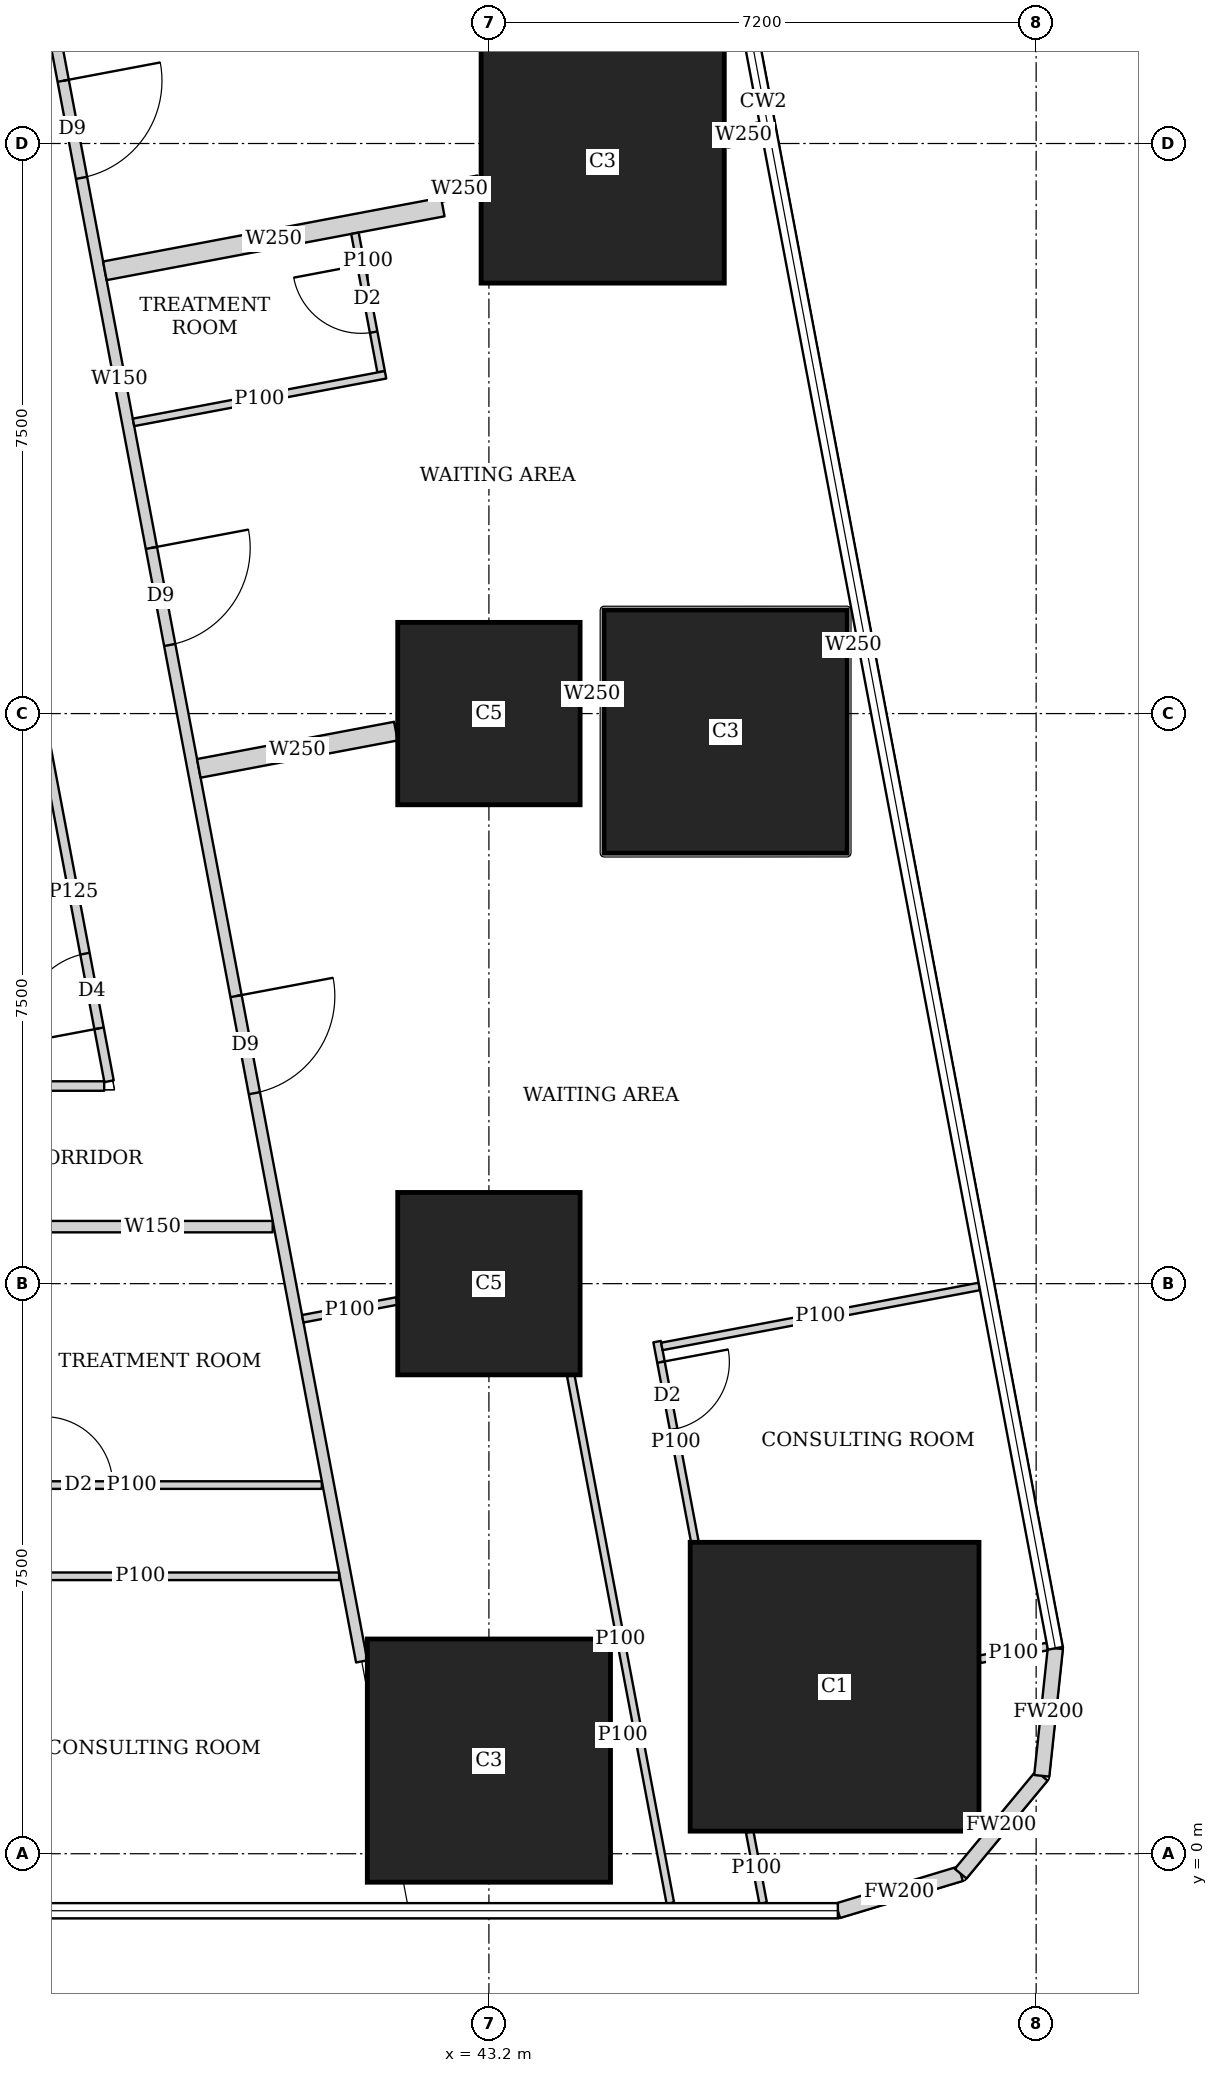
"""IFC4 building model, lengths in metres.
Left out: names, types, materials, properties, quantities, classifications, styles, units other than length and angle.
Written with IfcOpenShell. Run it as: python <this file> out.ifc"""

import sys

from ifc_helpers import new_model, si_unit, direction, frame, frame_2d, origin, origin_2d, place, context, subcontext, project, spatial, rectangle, extrude, element, fill, save


model = new_model("IFC4")
c1 = context("Model", 3, precision=1e-05, world=origin(), true_north=direction((0.0, 1.0)))
c2 = subcontext(c1, "Body", "Model", "MODEL_VIEW")
j1 = project(units=[si_unit("LENGTHUNIT", "METRE"), si_unit("PLANEANGLEUNIT", "RADIAN")], contexts=[c1])
p1 = place(None, origin())
s1 = spatial("IfcSite", under=j1, at=p1, CompositionType="ELEMENT")
p2 = place(p1, origin())
s2 = spatial("IfcBuilding", under=s1, at=p2, CompositionType="ELEMENT")
p3 = place(p2, frame((0.0, 0.0, 5.6)))
s3 = spatial("IfcBuildingStorey", under=s2, at=p3, CompositionType="ELEMENT", Elevation=5.6)
p4 = place(p3, frame((43.2, 1.225, 0.0), z_axis=(0.0, 0.0, 1.0), x_axis=(1.0, 0.0, 0.0)))
e1 = element("IfcColumn", 1, at=p4, inside=s3, PredefinedType="COLUMN", context=c2, shape_type="SweptSolid", body=[
    extrude(rectangle(XDim=3.2, YDim=3.2, at=origin_2d()), origin(), (0.0, 0.0, 1.0), 4.5),
])
p5 = place(p3, frame((47.748, 2.197, 0.0), z_axis=(0.0, 0.0, 1.0), x_axis=(1.0, 0.0, 0.0)))
e2 = element("IfcColumn", 2, at=p5, inside=s3, PredefinedType="COLUMN", context=c2, shape_type="SweptSolid", body=[
    extrude(rectangle(XDim=3.8, YDim=3.8, at=origin_2d()), origin(), (0.0, 0.0, 1.0), 4.5),
])
for number, where, z_axis, x_axis in (
    (3, (43.2, 7.5, 0.0), (0.0, 0.0, 1.0), (1.0, 0.0, 0.0)),
    (4, (43.2, 15.0, 0.0), (0.0, 0.0, 1.0), (1.0, 0.0, 0.0)),
):
    element("IfcColumn", number, at=place(p3, frame(where, z_axis=z_axis, x_axis=x_axis)), inside=s3, PredefinedType="COLUMN", context=c2, shape_type="SweptSolid", body=[
        extrude(rectangle(XDim=2.4, YDim=2.4, at=origin_2d()), origin(), (0.0, 0.0, 1.0), 4.5),
    ])
for number, where, z_axis, x_axis in (
    (5, (46.314, 14.763, 0.0), (0.0, 0.0, 1.0), (1.0, 0.0, 0.0)),
    (6, (44.697, 22.263, 0.0), (0.0, 0.0, 1.0), (1.0, 0.0, 0.0)),
):
    element("IfcColumn", number, at=place(p3, frame(where, z_axis=z_axis, x_axis=x_axis)), inside=s3, PredefinedType="COLUMN", context=c2, shape_type="SweptSolid", body=[
        extrude(rectangle(XDim=3.2, YDim=3.2, at=origin_2d()), origin(), (0.0, 0.0, 1.0), 4.5),
    ])
p6 = place(p3, frame((47.791, -0.75, 0.0), z_axis=(0.0, 0.0, 1.0), x_axis=(0.957455232626, 0.288581838509, 0.0)))
e7 = element("IfcWall", 7, at=p6, inside=s3, PredefinedType="SOLIDWALL", context=c2, shape_type="SweptSolid", body=[
    extrude(rectangle(XDim=1.688, YDim=0.2, at=frame_2d((0.844, 0.0))), origin(), (0.0, 0.0, 1.0), 4.2),
])
p7 = place(p3, frame((49.407, -0.263, 0.0), z_axis=(0.0, 0.0, 1.0), x_axis=(0.638042593423, 0.770001070764, 0.0)))
e8 = element("IfcWall", 8, at=p7, inside=s3, PredefinedType="SOLIDWALL", context=c2, shape_type="SweptSolid", body=[
    extrude(rectangle(XDim=1.673, YDim=0.2, at=frame_2d((0.836, 0.0))), origin(), (0.0, 0.0, 1.0), 4.2),
])
p8 = place(p3, frame((50.474, 1.025, 0.0), z_axis=(0.0, 0.0, 1.0), x_axis=(0.106047815515, 0.994361031429, 0.0)))
e9 = element("IfcWall", 9, at=p8, inside=s3, PredefinedType="SOLIDWALL", context=c2, shape_type="SweptSolid", body=[
    extrude(rectangle(XDim=1.688, YDim=0.2, at=frame_2d((0.844, 0.0))), origin(), (0.0, 0.0, 1.0), 4.2),
])
p9 = place(p3, frame((40.355, 8.25, 0.0), z_axis=(0.0, 0.0, 1.0), x_axis=(-1.0, 0.0, 0.0)))
e10 = element("IfcWall", 10, at=p9, inside=s3, PredefinedType="SOLIDWALL", context=c2, shape_type="SweptSolid", body=[
    extrude(rectangle(XDim=3.154, YDim=0.15, at=frame_2d((1.577, 0.0))), origin(), (0.0, 0.0, 1.0), 2.6),
])
p10 = place(p3, frame((35.151, 36.285, 0.0), z_axis=(0.0, 0.0, 1.0), x_axis=(0.18558085056, -0.982628998099, 0.0)))
e11 = element("IfcWall", 11, at=p10, inside=s3, PredefinedType="SOLIDWALL", context=c2, shape_type="SweptSolid", body=[
    extrude(rectangle(XDim=34.352, YDim=0.15, at=frame_2d((17.176, 0.0))), origin(), (0.0, 0.0, 1.0), 2.4),
])
p11 = place(p10, frame((13.189, 0.0, 0.0)))
e12 = element("IfcOpeningElement", 12, at=p11, cuts=e11, PredefinedType="OPENING", context=c2, shape_type="SweptSolid", body=[
    extrude(rectangle(XDim=1.3, YDim=2.1, at=frame_2d((0.65, 1.05))), frame((0.0, 0.085, 0.0), z_axis=(0.0, -1.0, 0.0), x_axis=(1.0, 0.0, 0.0)), (0.0, 0.0, 1.0), 0.17),
])
p12 = place(p10, frame((19.443, 0.0, 0.0)))
e13 = element("IfcOpeningElement", 13, at=p12, cuts=e11, PredefinedType="OPENING", context=c2, shape_type="SweptSolid", body=[
    extrude(rectangle(XDim=1.3, YDim=2.1, at=frame_2d((0.65, 1.05))), frame((0.0, 0.085, 0.0), z_axis=(0.0, -1.0, 0.0), x_axis=(1.0, 0.0, 0.0)), (0.0, 0.0, 1.0), 0.17),
])
p13 = place(p10, frame((25.444, 0.0, 0.0)))
e14 = element("IfcOpeningElement", 14, at=p13, cuts=e11, PredefinedType="OPENING", context=c2, shape_type="SweptSolid", body=[
    extrude(rectangle(XDim=1.3, YDim=2.1, at=frame_2d((0.65, 1.05))), frame((0.0, 0.085, 0.0), z_axis=(0.0, -1.0, 0.0), x_axis=(1.0, 0.0, 0.0)), (0.0, 0.0, 1.0), 0.17),
])
p14 = place(p3, frame((41.229, 3.65, 0.0), z_axis=(0.0, 0.0, 1.0), x_axis=(-1.0, 0.0, 0.0)))
e15 = element("IfcWall", 15, at=p14, inside=s3, PredefinedType="PARTITIONING", context=c2, shape_type="SweptSolid", body=[
    extrude(rectangle(XDim=5.229, YDim=0.1, at=frame_2d((2.615, 0.0))), origin(), (0.0, 0.0, 1.0), 4.2),
])
p15 = place(p14, frame((4.129, 0.0, 0.0)))
e16 = element("IfcOpeningElement", 16, at=p15, cuts=e15, PredefinedType="OPENING", context=c2, shape_type="SweptSolid", body=[
    extrude(rectangle(XDim=0.9, YDim=2.1, at=frame_2d((0.45, 1.05))), frame((0.0, 0.06, 0.0), z_axis=(0.0, -1.0, 0.0), x_axis=(1.0, 0.0, 0.0)), (0.0, 0.0, 1.0), 0.12),
])
p16 = place(p3, frame((41.002, 4.85, 0.0), z_axis=(0.0, 0.0, 1.0), x_axis=(-1.0, 0.0, 0.0)))
e17 = element("IfcWall", 17, at=p16, inside=s3, PredefinedType="PARTITIONING", context=c2, shape_type="SweptSolid", body=[
    extrude(rectangle(XDim=5.002, YDim=0.1, at=frame_2d((2.501, 0.0))), origin(), (0.0, 0.0, 1.0), 4.2),
])
p17 = place(p16, frame((2.752, 0.0, 0.0)))
e18 = element("IfcOpeningElement", 18, at=p17, cuts=e17, PredefinedType="OPENING", context=c2, shape_type="SweptSolid", body=[
    extrude(rectangle(XDim=0.9, YDim=2.1, at=frame_2d((0.45, 1.05))), frame((0.0, 0.06, 0.0), z_axis=(0.0, -1.0, 0.0), x_axis=(1.0, 0.0, 0.0)), (0.0, 0.0, 1.0), 0.12),
])
p18 = place(p3, frame((41.437, 21.319, 0.0), z_axis=(0.0, 0.0, 1.0), x_axis=(0.186029078128, -0.982544239254, 0.0)))
e19 = element("IfcWall", 19, at=p18, inside=s3, PredefinedType="PARTITIONING", context=c2, shape_type="SweptSolid", body=[
    extrude(rectangle(XDim=1.854, YDim=0.1, at=frame_2d((0.927, 0.0))), origin(), (0.0, 0.0, 1.0), 4.2),
])
p19 = place(p18, frame((0.424, 0.0, 0.0)))
e20 = element("IfcOpeningElement", 20, at=p19, cuts=e19, PredefinedType="OPENING", context=c2, shape_type="SweptSolid", body=[
    extrude(rectangle(XDim=0.9, YDim=2.1, at=frame_2d((0.45, 1.05))), frame((0.0, 0.06, 0.0), z_axis=(0.0, -1.0, 0.0), x_axis=(1.0, 0.0, 0.0)), (0.0, 0.0, 1.0), 0.12),
])
p20 = place(p3, frame((41.84, 19.457, 0.0), z_axis=(0.0, 0.0, 1.0), x_axis=(-0.98264623159, -0.185489577987, 0.0)))
e21 = element("IfcWall", 21, at=p20, inside=s3, PredefinedType="PARTITIONING", context=c2, shape_type="SweptSolid", body=[
    extrude(rectangle(XDim=3.375, YDim=0.1, at=frame_2d((1.688, 0.0))), origin(), (0.0, 0.0, 1.0), 4.2),
])
p21 = place(p3, frame((46.782, 22.657, 0.0), z_axis=(0.0, 0.0, 1.0), x_axis=(-0.982683117999, -0.185294062504, 0.0)))
e22 = element("IfcWall", 22, at=p21, inside=s3, PredefinedType="SOLIDWALL", context=c2, shape_type="SweptSolid", body=[
    extrude(rectangle(XDim=0.469, YDim=0.25, at=frame_2d((0.234, 0.0))), origin(), (0.0, 0.0, 1.0), 2.4),
])
p22 = place(p3, frame((43.073, 21.956, 0.0), z_axis=(0.0, 0.0, 1.0), x_axis=(-0.982395465615, -0.18681313963, 0.0)))
e23 = element("IfcWall", 23, at=p22, inside=s3, PredefinedType="SOLIDWALL", context=c2, shape_type="SweptSolid", body=[
    extrude(rectangle(XDim=0.525, YDim=0.25, at=frame_2d((0.263, 0.0))), origin(), (0.0, 0.0, 1.0), 2.6),
])
p23 = place(p3, frame((42.593, 21.665, 0.0), z_axis=(0.0, 0.0, 1.0), x_axis=(-0.982612837616, -0.185666398014, 0.0)))
e24 = element("IfcWall", 24, at=p23, inside=s3, PredefinedType="SOLIDWALL", context=c2, shape_type="SweptSolid", body=[
    extrude(rectangle(XDim=4.525, YDim=0.25, at=frame_2d((2.262, 0.0))), origin(), (0.0, 0.0, 1.0), 2.6),
])
p24 = place(p3, frame((45.413, 6.737, 0.0), z_axis=(0.0, 0.0, 1.0), x_axis=(0.185263269673, -0.982688923775, 0.0)))
e25 = element("IfcWall", 25, at=p24, inside=s3, PredefinedType="PARTITIONING", context=c2, shape_type="SweptSolid", body=[
    extrude(rectangle(XDim=2.677, YDim=0.1, at=frame_2d((1.338, 0.0))), origin(), (0.0, 0.0, 1.0), 4.2),
])
p25 = place(p24, frame((0.274, 0.0, 0.0)))
e26 = element("IfcOpeningElement", 26, at=p25, cuts=e25, PredefinedType="OPENING", context=c2, shape_type="SweptSolid", body=[
    extrude(rectangle(XDim=0.9, YDim=2.1, at=frame_2d((0.45, 1.05))), frame((0.0, 0.06, 0.0), z_axis=(0.0, -1.0, 0.0), x_axis=(1.0, 0.0, 0.0)), (0.0, 0.0, 1.0), 0.12),
])
p26 = place(p3, frame((46.631, 0.287, 0.0), z_axis=(0.0, 0.0, 1.0), x_axis=(0.185617761613, -0.982622026302, 0.0)))
e27 = element("IfcWall", 27, at=p26, inside=s3, PredefinedType="PARTITIONING", context=c2, shape_type="SweptSolid", body=[
    extrude(rectangle(XDim=0.954, YDim=0.1, at=frame_2d((0.477, 0.0))), origin(), (0.0, 0.0, 1.0), 4.2),
])
p27 = place(p3, frame((44.277, 6.29, 0.0), z_axis=(0.0, 0.0, 1.0), x_axis=(0.18546139356, -0.982651551415, 0.0)))
e28 = element("IfcWall", 28, at=p27, inside=s3, PredefinedType="PARTITIONING", context=c2, shape_type="SweptSolid", body=[
    extrude(rectangle(XDim=7.062, YDim=0.1, at=frame_2d((3.531, 0.0))), origin(), (0.0, 0.0, 1.0), 4.2),
])
p28 = place(p3, frame((49.652, 7.463, 0.0), z_axis=(0.0, 0.0, 1.0), x_axis=(-0.982631433279, -0.185567956101, 0.0)))
e29 = element("IfcWall", 29, at=p28, inside=s3, PredefinedType="PARTITIONING", context=c2, shape_type="SweptSolid", body=[
    extrude(rectangle(XDim=4.251, YDim=0.1, at=frame_2d((2.125, 0.0))), origin(), (0.0, 0.0, 1.0), 2.4),
])
p29 = place(p3, frame((50.547, 2.726, 0.0), z_axis=(0.0, 0.0, 1.0), x_axis=(-0.982620821037, -0.18562414192, 0.0)))
e30 = element("IfcWall", 30, at=p29, inside=s3, PredefinedType="PARTITIONING", context=c2, shape_type="SweptSolid", body=[
    extrude(rectangle(XDim=0.905, YDim=0.1, at=frame_2d((0.452, 0.0))), origin(), (0.0, 0.0, 1.0), 4.2),
])
p30 = place(p3, frame((41.99, 7.272, 0.0), z_axis=(0.0, 0.0, 1.0), x_axis=(-0.982645675559, -0.185492523583, 0.0)))
e31 = element("IfcWall", 31, at=p30, inside=s3, PredefinedType="PARTITIONING", context=c2, shape_type="SweptSolid", body=[
    extrude(rectangle(XDim=1.261, YDim=0.1, at=frame_2d((0.63, 0.0))), origin(), (0.0, 0.0, 1.0), 2.6),
])
p31 = place(p3, frame((45.114, 1.587, 0.0), z_axis=(0.0, 0.0, 1.0), x_axis=(-0.982934694903, -0.183954846516, 0.0)))
e32 = element("IfcWall", 32, at=p31, inside=s3, PredefinedType="PARTITIONING", context=c2, shape_type="SweptSolid", body=[
    extrude(rectangle(XDim=0.309, YDim=0.1, at=frame_2d((0.155, 0.0))), origin(), (0.0, 0.0, 1.0), 4.2),
])
p32 = place(p3, frame((48.055, 15.917, 0.0), z_axis=(0.0, 0.0, 1.0), x_axis=(-0.98280243359, -0.184660164975, 0.0)))
e33 = element("IfcWall", 33, at=p32, inside=s3, PredefinedType="SOLIDWALL", context=c2, shape_type="SweptSolid", body=[
    extrude(rectangle(XDim=0.119, YDim=0.25, at=frame_2d((0.06, 0.0))), origin(), (0.0, 0.0, 1.0), 4.2),
])
p33 = place(p3, frame((44.69, 15.281, 0.0), z_axis=(0.0, 0.0, 1.0), x_axis=(-0.982739122219, -0.184996804458, 0.0)))
e34 = element("IfcWall", 34, at=p33, inside=s3, PredefinedType="SOLIDWALL", context=c2, shape_type="SweptSolid", body=[
    extrude(rectangle(XDim=0.271, YDim=0.25, at=frame_2d((0.135, 0.0))), origin(), (0.0, 0.0, 1.0), 4.2),
])
p34 = place(p3, frame((41.976, 14.769, 0.0), z_axis=(0.0, 0.0, 1.0), x_axis=(-0.982610412957, -0.185679229715, 0.0)))
e35 = element("IfcWall", 35, at=p34, inside=s3, PredefinedType="SOLIDWALL", context=c2, shape_type="SweptSolid", body=[
    extrude(rectangle(XDim=2.639, YDim=0.25, at=frame_2d((1.319, 0.0))), origin(), (0.0, 0.0, 1.0), 2.6),
])
p35 = place(p3, frame((28.95, 10.1, 0.0), z_axis=(0.0, 0.0, 1.0), x_axis=(1.0, 0.0, 0.0)))
e36 = element("IfcWall", 36, at=p35, inside=s3, PredefinedType="PARTITIONING", context=c2, shape_type="SweptSolid", body=[
    extrude(rectangle(XDim=9.188, YDim=0.125, at=frame_2d((4.594, 0.0))), origin(), (0.0, 0.0, 1.0), 2.2),
])
p36 = place(p3, frame((38.202, 10.163, 0.0), z_axis=(0.0, 0.0, 1.0), x_axis=(-0.185539561605, 0.982636795097, 0.0)))
e37 = element("IfcWall", 37, at=p36, inside=s3, PredefinedType="PARTITIONING", context=c2, shape_type="SweptSolid", body=[
    extrude(rectangle(XDim=5.066, YDim=0.125, at=frame_2d((2.533, 0.0))), origin(), (0.0, 0.0, 1.0), 2.6),
])
p37 = place(p36, frame((0.708, 0.0, 0.0)))
e38 = element("IfcOpeningElement", 38, at=p37, cuts=e37, PredefinedType="OPENING", context=c2, shape_type="SweptSolid", body=[
    extrude(rectangle(XDim=1.0, YDim=2.1, at=frame_2d((0.5, 1.05))), frame((0.0, 0.073, 0.0), z_axis=(0.0, -1.0, 0.0), x_axis=(1.0, 0.0, 0.0)), (0.0, 0.0, 1.0), 0.145),
])
p38 = place(p17, origin())
e39 = element("IfcDoor", 39, at=p38, inside=s3, OperationType="SINGLE_SWING_LEFT", PredefinedType="DOOR", context=c2, shape_type="SweptSolid", body=[
    extrude(rectangle(XDim=0.9, YDim=2.1, at=frame_2d((0.45, 1.05))), frame((0.0, 0.025, 0.0), z_axis=(0.0, -1.0, 0.0), x_axis=(1.0, 0.0, 0.0)), (0.0, 0.0, 1.0), 0.05),
])
fill(e18, e39)
p39 = place(p11, origin())
e40 = element("IfcDoor", 40, at=p39, inside=s3, OperationType="DOUBLE_DOOR_SINGLE_SWING", PredefinedType="DOOR", context=c2, shape_type="SweptSolid", body=[
    extrude(rectangle(XDim=1.3, YDim=2.1, at=frame_2d((0.65, 1.05))), frame((0.0, 0.025, 0.0), z_axis=(0.0, -1.0, 0.0), x_axis=(1.0, 0.0, 0.0)), (0.0, 0.0, 1.0), 0.05),
])
fill(e12, e40)
p40 = place(p19, origin())
e41 = element("IfcDoor", 41, at=p40, inside=s3, OperationType="SINGLE_SWING_RIGHT", PredefinedType="DOOR", context=c2, shape_type="SweptSolid", body=[
    extrude(rectangle(XDim=0.9, YDim=2.1, at=frame_2d((0.45, 1.05))), frame((0.0, 0.025, 0.0), z_axis=(0.0, -1.0, 0.0), x_axis=(1.0, 0.0, 0.0)), (0.0, 0.0, 1.0), 0.05),
])
fill(e20, e41)
p41 = place(p12, origin())
e42 = element("IfcDoor", 42, at=p41, inside=s3, OperationType="DOUBLE_DOOR_SINGLE_SWING", PredefinedType="DOOR", context=c2, shape_type="SweptSolid", body=[
    extrude(rectangle(XDim=1.3, YDim=2.1, at=frame_2d((0.65, 1.05))), frame((0.0, 0.025, 0.0), z_axis=(0.0, -1.0, 0.0), x_axis=(1.0, 0.0, 0.0)), (0.0, 0.0, 1.0), 0.05),
])
fill(e13, e42)
p42 = place(p25, origin())
e43 = element("IfcDoor", 43, at=p42, inside=s3, OperationType="SINGLE_SWING_LEFT", PredefinedType="DOOR", context=c2, shape_type="SweptSolid", body=[
    extrude(rectangle(XDim=0.9, YDim=2.1, at=frame_2d((0.45, 1.05))), frame((0.0, 0.025, 0.0), z_axis=(0.0, -1.0, 0.0), x_axis=(1.0, 0.0, 0.0)), (0.0, 0.0, 1.0), 0.05),
])
fill(e26, e43)
p43 = place(p13, origin())
e44 = element("IfcDoor", 44, at=p43, inside=s3, OperationType="DOUBLE_DOOR_SINGLE_SWING", PredefinedType="DOOR", context=c2, shape_type="SweptSolid", body=[
    extrude(rectangle(XDim=1.3, YDim=2.1, at=frame_2d((0.65, 1.05))), frame((0.0, 0.025, 0.0), z_axis=(0.0, -1.0, 0.0), x_axis=(1.0, 0.0, 0.0)), (0.0, 0.0, 1.0), 0.05),
])
fill(e14, e44)
p44 = place(p37, origin())
e45 = element("IfcDoor", 45, at=p44, inside=s3, OperationType="SINGLE_SWING_LEFT", PredefinedType="DOOR", context=c2, shape_type="SweptSolid", body=[
    extrude(rectangle(XDim=1.0, YDim=2.1, at=frame_2d((0.5, 1.05))), frame((0.0, 0.025, 0.0), z_axis=(0.0, -1.0, 0.0), x_axis=(1.0, 0.0, 0.0)), (0.0, 0.0, 1.0), 0.05),
])
fill(e38, e45)
save(model, sys.argv[1])
